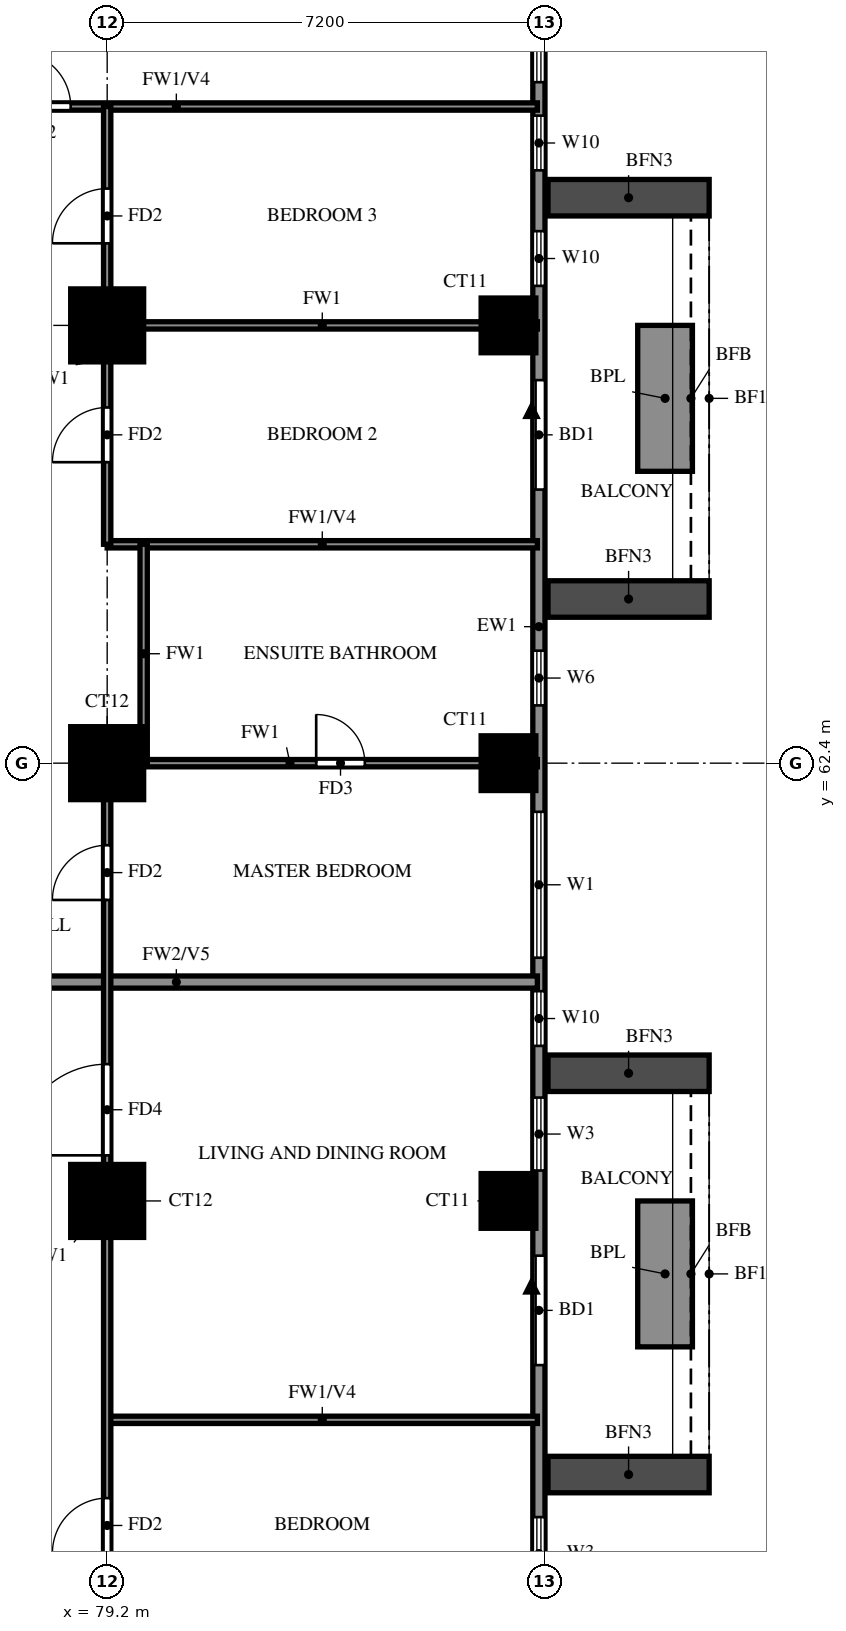
"""IFC4 building model, lengths in metres.
Left out: names, types, materials, properties, quantities, classifications, styles, units other than length and angle.
Written with IfcOpenShell. Run it as: python <this file> out.ifc"""

import sys

from ifc_helpers import new_model, si_unit, direction, frame, frame_2d, origin, origin_2d, place, context, subcontext, project, spatial, rectangle, extrude, source, transform, mapped, element, fill, save


model = new_model("IFC4")
c1 = context("Model", 3, precision=1e-05, world=origin(), true_north=direction((0.0, 1.0)))
c2 = subcontext(c1, "Body", "Model", "MODEL_VIEW")
j1 = project(units=[si_unit("LENGTHUNIT", "METRE"), si_unit("PLANEANGLEUNIT", "RADIAN")], contexts=[c1])
p1 = place(None, origin())
s1 = spatial("IfcSite", under=j1, at=p1, CompositionType="ELEMENT")
p2 = place(p1, origin())
s2 = spatial("IfcBuilding", under=s1, at=p2, CompositionType="ELEMENT")
p3 = place(p2, frame((0.0, 0.0, 93.5)))
s3 = spatial("IfcBuildingStorey", under=s2, at=p3, CompositionType="ELEMENT", Elevation=93.5)
m1 = source(origin(), c2, "Body", "SweptSolid", [
    extrude(rectangle(XDim=1.2, YDim=1.2, at=origin_2d()), origin(), (0.0, 0.0, 1.0), 3.18),
])
p4 = place(p3, frame((79.2, 55.2, 0.0), z_axis=(0.0, 0.0, 1.0), x_axis=(1.0, 0.0, 0.0)))
e1 = element("IfcColumn", 1, at=p4, inside=s3, PredefinedType="COLUMN", context=c2, shape_type="MappedRepresentation", body=[
    mapped(m1, transform((0.0, 0.0, 0.0))),
])
m2 = source(origin(), c2, "Body", "SweptSolid", [
    extrude(rectangle(XDim=0.9, YDim=0.9, at=origin_2d()), origin(), (0.0, 0.0, 1.0), 3.18),
])
p5 = place(p3, frame((85.8, 55.2, 0.0), z_axis=(0.0, 0.0, 1.0), x_axis=(1.0, 0.0, 0.0)))
e2 = element("IfcColumn", 2, at=p5, inside=s3, PredefinedType="COLUMN", context=c2, shape_type="MappedRepresentation", body=[
    mapped(m2, transform((0.0, 0.0, 0.0))),
])
p6 = place(p3, frame((79.2, 62.4, 0.0), z_axis=(0.0, 0.0, 1.0), x_axis=(1.0, 0.0, 0.0)))
e3 = element("IfcColumn", 3, at=p6, inside=s3, PredefinedType="COLUMN", context=c2, shape_type="MappedRepresentation", body=[
    mapped(m1, transform((0.0, 0.0, 0.0))),
])
p7 = place(p3, frame((85.8, 62.4, 0.0), z_axis=(0.0, 0.0, 1.0), x_axis=(1.0, 0.0, 0.0)))
e4 = element("IfcColumn", 4, at=p7, inside=s3, PredefinedType="COLUMN", context=c2, shape_type="MappedRepresentation", body=[
    mapped(m2, transform((0.0, 0.0, 0.0))),
])
p8 = place(p3, frame((79.2, 69.6, 0.0), z_axis=(0.0, 0.0, 1.0), x_axis=(1.0, 0.0, 0.0)))
e5 = element("IfcColumn", 5, at=p8, inside=s3, PredefinedType="COLUMN", context=c2, shape_type="MappedRepresentation", body=[
    mapped(m1, transform((0.0, 0.0, 0.0))),
])
p9 = place(p3, frame((85.8, 69.6, 0.0), z_axis=(0.0, 0.0, 1.0), x_axis=(1.0, 0.0, 0.0)))
e6 = element("IfcColumn", 6, at=p9, inside=s3, PredefinedType="COLUMN", context=c2, shape_type="MappedRepresentation", body=[
    mapped(m2, transform((0.0, 0.0, 0.0))),
])
p10 = place(p3, frame((86.3, 48.2, 0.0), z_axis=(0.0, 0.0, 1.0), x_axis=(0.0, 1.0, 0.0)))
e7 = element("IfcWall", 7, at=p10, inside=s3, PredefinedType="SOLIDWALL", context=c2, shape_type="SweptSolid", body=[
    extrude(rectangle(XDim=28.6, YDim=0.2, at=frame_2d((14.3, 0.0))), origin(), (0.0, 0.0, 1.0), 3.18),
])
p11 = place(p10, frame((4.3, 0.0, 0.0)))
e8 = element("IfcOpeningElement", 8, at=p11, cuts=e7, PredefinedType="OPENING", context=c2, shape_type="SweptSolid", body=[
    extrude(rectangle(XDim=1.8, YDim=2.4, at=frame_2d((0.9, 1.2))), frame((0.0, 0.11, 0.0), z_axis=(0.0, -1.0, 0.0), x_axis=(1.0, 0.0, 0.0)), (0.0, 0.0, 1.0), 0.22),
])
p12 = place(p10, frame((18.7, 0.0, 0.0)))
e9 = element("IfcOpeningElement", 9, at=p12, cuts=e7, PredefinedType="OPENING", context=c2, shape_type="SweptSolid", body=[
    extrude(rectangle(XDim=1.8, YDim=2.4, at=frame_2d((0.9, 1.2))), frame((0.0, 0.11, 0.0), z_axis=(0.0, -1.0, 0.0), x_axis=(1.0, 0.0, 0.0)), (0.0, 0.0, 1.0), 0.22),
])
p13 = place(p10, frame((0.6, 0.0, 0.6)))
e10 = element("IfcOpeningElement", 10, at=p13, cuts=e7, PredefinedType="OPENING", context=c2, shape_type="SweptSolid", body=[
    extrude(rectangle(XDim=1.2, YDim=2.4, at=frame_2d((0.6, 1.2))), frame((0.0, 0.11, 0.0), z_axis=(0.0, -1.0, 0.0), x_axis=(1.0, 0.0, 0.0)), (0.0, 0.0, 1.0), 0.22),
])
p14 = place(p10, frame((7.5, 0.0, 0.6)))
e11 = element("IfcOpeningElement", 11, at=p14, cuts=e7, PredefinedType="OPENING", context=c2, shape_type="SweptSolid", body=[
    extrude(rectangle(XDim=1.2, YDim=2.4, at=frame_2d((0.6, 1.2))), frame((0.0, 0.11, 0.0), z_axis=(0.0, -1.0, 0.0), x_axis=(1.0, 0.0, 0.0)), (0.0, 0.0, 1.0), 0.22),
])
p15 = place(p10, frame((9.55, 0.0, 0.6)))
e12 = element("IfcOpeningElement", 12, at=p15, cuts=e7, PredefinedType="OPENING", context=c2, shape_type="SweptSolid", body=[
    extrude(rectangle(XDim=0.9, YDim=2.4, at=frame_2d((0.45, 1.2))), frame((0.0, 0.11, 0.0), z_axis=(0.0, -1.0, 0.0), x_axis=(1.0, 0.0, 0.0)), (0.0, 0.0, 1.0), 0.22),
])
p16 = place(p10, frame((11.0, 0.0, 0.6)))
e13 = element("IfcOpeningElement", 13, at=p16, cuts=e7, PredefinedType="OPENING", context=c2, shape_type="SweptSolid", body=[
    extrude(rectangle(XDim=2.4, YDim=2.4, at=frame_2d((1.2, 1.2))), frame((0.0, 0.11, 0.0), z_axis=(0.0, -1.0, 0.0), x_axis=(1.0, 0.0, 0.0)), (0.0, 0.0, 1.0), 0.22),
])
p17 = place(p10, frame((15.15, 0.0, 1.5)))
e14 = element("IfcOpeningElement", 14, at=p17, cuts=e7, PredefinedType="OPENING", context=c2, shape_type="SweptSolid", body=[
    extrude(rectangle(XDim=0.9, YDim=0.9, at=frame_2d((0.45, 0.45))), frame((0.0, 0.11, 0.0), z_axis=(0.0, -1.0, 0.0), x_axis=(1.0, 0.0, 0.0)), (0.0, 0.0, 1.0), 0.22),
])
p18 = place(p10, frame((22.05, 0.0, 0.6)))
e15 = element("IfcOpeningElement", 15, at=p18, cuts=e7, PredefinedType="OPENING", context=c2, shape_type="SweptSolid", body=[
    extrude(rectangle(XDim=0.9, YDim=2.4, at=frame_2d((0.45, 1.2))), frame((0.0, 0.11, 0.0), z_axis=(0.0, -1.0, 0.0), x_axis=(1.0, 0.0, 0.0)), (0.0, 0.0, 1.0), 0.22),
])
p19 = place(p10, frame((23.95, 0.0, 0.6)))
e16 = element("IfcOpeningElement", 16, at=p19, cuts=e7, PredefinedType="OPENING", context=c2, shape_type="SweptSolid", body=[
    extrude(rectangle(XDim=0.9, YDim=2.4, at=frame_2d((0.45, 1.2))), frame((0.0, 0.11, 0.0), z_axis=(0.0, -1.0, 0.0), x_axis=(1.0, 0.0, 0.0)), (0.0, 0.0, 1.0), 0.22),
])
p20 = place(p10, frame((25.4, 0.0, 0.6)))
e17 = element("IfcOpeningElement", 17, at=p20, cuts=e7, PredefinedType="OPENING", context=c2, shape_type="SweptSolid", body=[
    extrude(rectangle(XDim=2.4, YDim=2.4, at=frame_2d((1.2, 1.2))), frame((0.0, 0.11, 0.0), z_axis=(0.0, -1.0, 0.0), x_axis=(1.0, 0.0, 0.0)), (0.0, 0.0, 1.0), 0.22),
])
for number, where, z_axis, x_axis in (
    (18, (86.45, 50.7, 0.0), (0.0, 0.0, 1.0), (1.0, 0.0, 0.0)),
    (19, (86.45, 57.3, 0.0), (0.0, 0.0, 1.0), (1.0, 0.0, 0.0)),
):
    element("IfcWall", number, at=place(p3, frame(where, z_axis=z_axis, x_axis=x_axis)), inside=s3, PredefinedType="SOLIDWALL", context=c2, shape_type="SweptSolid", body=[
        extrude(rectangle(XDim=2.65, YDim=0.6, at=frame_2d((1.325, 0.0))), origin(), (0.0, 0.0, 1.0), 2.85),
    ])
p21 = place(p3, frame((88.375, 52.8, 0.0), z_axis=(0.0, 0.0, 1.0), x_axis=(0.0, 1.0, 0.0)))
e20 = element("IfcWall", 20, at=p21, inside=s3, PredefinedType="SOLIDWALL", context=c2, shape_type="SweptSolid", body=[
    extrude(rectangle(XDim=2.4, YDim=0.9, at=frame_2d((1.2, 0.0))), origin(), (0.0, 0.0, 1.0), 0.9),
])
for number, where, z_axis, x_axis in (
    (21, (86.45, 65.1, 0.0), (0.0, 0.0, 1.0), (1.0, 0.0, 0.0)),
    (22, (86.45, 71.7, 0.0), (0.0, 0.0, 1.0), (1.0, 0.0, 0.0)),
):
    element("IfcWall", number, at=place(p3, frame(where, z_axis=z_axis, x_axis=x_axis)), inside=s3, PredefinedType="SOLIDWALL", context=c2, shape_type="SweptSolid", body=[
        extrude(rectangle(XDim=2.65, YDim=0.6, at=frame_2d((1.325, 0.0))), origin(), (0.0, 0.0, 1.0), 2.85),
    ])
p22 = place(p3, frame((88.375, 67.2, 0.0), z_axis=(0.0, 0.0, 1.0), x_axis=(0.0, 1.0, 0.0)))
e23 = element("IfcWall", 23, at=p22, inside=s3, PredefinedType="SOLIDWALL", context=c2, shape_type="SweptSolid", body=[
    extrude(rectangle(XDim=2.4, YDim=0.9, at=frame_2d((1.2, 0.0))), origin(), (0.0, 0.0, 1.0), 0.9),
])
p23 = place(p3, frame((74.4, 58.8, 0.0), z_axis=(0.0, 0.0, 1.0), x_axis=(1.0, 0.0, 0.0)))
e24 = element("IfcWall", 24, at=p23, inside=s3, PredefinedType="SOLIDWALL", context=c2, shape_type="SweptSolid", body=[
    extrude(rectangle(XDim=11.875, YDim=0.2, at=frame_2d((5.938, 0.0))), origin(), (0.0, 0.0, 1.0), 2.28),
])
p24 = place(p3, frame((79.2, 51.6, 0.0), z_axis=(0.0, 0.0, 1.0), x_axis=(1.0, 0.0, 0.0)))
e25 = element("IfcWall", 25, at=p24, inside=s3, PredefinedType="PARTITIONING", context=c2, shape_type="SweptSolid", body=[
    extrude(rectangle(XDim=7.075, YDim=0.12, at=frame_2d((3.538, 0.0))), origin(), (0.0, 0.0, 1.0), 2.28),
])
p25 = place(p3, frame((79.2, 62.4, 0.0), z_axis=(0.0, 0.0, 1.0), x_axis=(1.0, 0.0, 0.0)))
e26 = element("IfcWall", 26, at=p25, inside=s3, PredefinedType="PARTITIONING", context=c2, shape_type="SweptSolid", body=[
    extrude(rectangle(XDim=7.075, YDim=0.12, at=frame_2d((3.538, 0.0))), origin(), (0.0, 0.0, 1.0), 3.18),
])
p26 = place(p25, frame((3.438, 0.0, 0.0)))
e27 = element("IfcOpeningElement", 27, at=p26, cuts=e26, PredefinedType="OPENING", context=c2, shape_type="SweptSolid", body=[
    extrude(rectangle(XDim=0.8, YDim=2.1, at=frame_2d((0.4, 1.05))), frame((0.0, 0.07, 0.0), z_axis=(0.0, -1.0, 0.0), x_axis=(1.0, 0.0, 0.0)), (0.0, 0.0, 1.0), 0.14),
])
p27 = place(p3, frame((79.2, 66.0, 0.0), z_axis=(0.0, 0.0, 1.0), x_axis=(1.0, 0.0, 0.0)))
e28 = element("IfcWall", 28, at=p27, inside=s3, PredefinedType="PARTITIONING", context=c2, shape_type="SweptSolid", body=[
    extrude(rectangle(XDim=7.075, YDim=0.12, at=frame_2d((3.538, 0.0))), origin(), (0.0, 0.0, 1.0), 2.28),
])
p28 = place(p3, frame((79.2, 69.6, 0.0), z_axis=(0.0, 0.0, 1.0), x_axis=(1.0, 0.0, 0.0)))
e29 = element("IfcWall", 29, at=p28, inside=s3, PredefinedType="PARTITIONING", context=c2, shape_type="SweptSolid", body=[
    extrude(rectangle(XDim=7.075, YDim=0.12, at=frame_2d((3.538, 0.0))), origin(), (0.0, 0.0, 1.0), 3.18),
])
p29 = place(p3, frame((74.4, 73.2, 0.0), z_axis=(0.0, 0.0, 1.0), x_axis=(1.0, 0.0, 0.0)))
e30 = element("IfcWall", 30, at=p29, inside=s3, PredefinedType="PARTITIONING", context=c2, shape_type="SweptSolid", body=[
    extrude(rectangle(XDim=11.875, YDim=0.12, at=frame_2d((5.938, 0.0))), origin(), (0.0, 0.0, 1.0), 2.28),
])
p30 = place(p29, frame((3.3, 0.0, 0.0)))
e31 = element("IfcOpeningElement", 31, at=p30, cuts=e30, PredefinedType="OPENING", context=c2, shape_type="SweptSolid", body=[
    extrude(rectangle(XDim=0.9, YDim=2.1, at=frame_2d((0.45, 1.05))), frame((0.0, 0.07, 0.0), z_axis=(0.0, -1.0, 0.0), x_axis=(1.0, 0.0, 0.0)), (0.0, 0.0, 1.0), 0.14),
])
p31 = place(p3, frame((79.2, 48.125, 0.0), z_axis=(0.0, 0.0, 1.0), x_axis=(0.0, 1.0, 0.0)))
e32 = element("IfcWall", 32, at=p31, inside=s3, PredefinedType="PARTITIONING", context=c2, shape_type="SweptSolid", body=[
    extrude(rectangle(XDim=14.275, YDim=0.12, at=frame_2d((7.137, 0.0))), origin(), (0.0, 0.0, 1.0), 3.18),
])
p32 = place(p31, frame((1.288, 0.0, 0.0)))
e33 = element("IfcOpeningElement", 33, at=p32, cuts=e32, PredefinedType="OPENING", context=c2, shape_type="SweptSolid", body=[
    extrude(rectangle(XDim=0.9, YDim=2.1, at=frame_2d((0.45, 1.05))), frame((0.0, 0.07, 0.0), z_axis=(0.0, -1.0, 0.0), x_axis=(1.0, 0.0, 0.0)), (0.0, 0.0, 1.0), 0.14),
])
p33 = place(p31, frame((7.825, 0.0, 0.0)))
e34 = element("IfcOpeningElement", 34, at=p33, cuts=e32, PredefinedType="OPENING", context=c2, shape_type="SweptSolid", body=[
    extrude(rectangle(XDim=1.5, YDim=2.1, at=frame_2d((0.75, 1.05))), frame((0.0, 0.07, 0.0), z_axis=(0.0, -1.0, 0.0), x_axis=(1.0, 0.0, 0.0)), (0.0, 0.0, 1.0), 0.14),
])
p34 = place(p31, frame((12.025, 0.0, 0.0)))
e35 = element("IfcOpeningElement", 35, at=p34, cuts=e32, PredefinedType="OPENING", context=c2, shape_type="SweptSolid", body=[
    extrude(rectangle(XDim=0.9, YDim=2.1, at=frame_2d((0.45, 1.05))), frame((0.0, 0.07, 0.0), z_axis=(0.0, -1.0, 0.0), x_axis=(1.0, 0.0, 0.0)), (0.0, 0.0, 1.0), 0.14),
])
p35 = place(p3, frame((79.2, 66.0, 0.0), z_axis=(0.0, 0.0, 1.0), x_axis=(0.0, 1.0, 0.0)))
e36 = element("IfcWall", 36, at=p35, inside=s3, PredefinedType="PARTITIONING", context=c2, shape_type="SweptSolid", body=[
    extrude(rectangle(XDim=7.2, YDim=0.12, at=frame_2d((3.6, 0.0))), origin(), (0.0, 0.0, 1.0), 3.18),
])
p36 = place(p35, frame((1.35, 0.0, 0.0)))
e37 = element("IfcOpeningElement", 37, at=p36, cuts=e36, PredefinedType="OPENING", context=c2, shape_type="SweptSolid", body=[
    extrude(rectangle(XDim=0.9, YDim=2.1, at=frame_2d((0.45, 1.05))), frame((0.0, 0.07, 0.0), z_axis=(0.0, -1.0, 0.0), x_axis=(1.0, 0.0, 0.0)), (0.0, 0.0, 1.0), 0.14),
])
p37 = place(p35, frame((4.95, 0.0, 0.0)))
e38 = element("IfcOpeningElement", 38, at=p37, cuts=e36, PredefinedType="OPENING", context=c2, shape_type="SweptSolid", body=[
    extrude(rectangle(XDim=0.9, YDim=2.1, at=frame_2d((0.45, 1.05))), frame((0.0, 0.07, 0.0), z_axis=(0.0, -1.0, 0.0), x_axis=(1.0, 0.0, 0.0)), (0.0, 0.0, 1.0), 0.14),
])
p38 = place(p3, frame((79.8, 62.4, 0.0), z_axis=(0.0, 0.0, 1.0), x_axis=(0.0, 1.0, 0.0)))
e39 = element("IfcWall", 39, at=p38, inside=s3, PredefinedType="PARTITIONING", context=c2, shape_type="SweptSolid", body=[
    extrude(rectangle(XDim=3.6, YDim=0.12, at=frame_2d((1.8, 0.0))), origin(), (0.0, 0.0, 1.0), 3.18),
])
p39 = place(p11, origin())
e40 = element("IfcDoor", 40, at=p39, inside=s3, OperationType="DOUBLE_DOOR_SLIDING", PredefinedType="DOOR", context=c2, shape_type="SweptSolid", body=[
    extrude(rectangle(XDim=1.8, YDim=2.4, at=frame_2d((0.9, 1.2))), frame((0.0, 0.025, 0.0), z_axis=(0.0, -1.0, 0.0), x_axis=(1.0, 0.0, 0.0)), (0.0, 0.0, 1.0), 0.05),
])
fill(e8, e40)
p40 = place(p12, origin())
e41 = element("IfcDoor", 41, at=p40, inside=s3, OperationType="DOUBLE_DOOR_SLIDING", PredefinedType="DOOR", context=c2, shape_type="SweptSolid", body=[
    extrude(rectangle(XDim=1.8, YDim=2.4, at=frame_2d((0.9, 1.2))), frame((0.0, 0.025, 0.0), z_axis=(0.0, -1.0, 0.0), x_axis=(1.0, 0.0, 0.0)), (0.0, 0.0, 1.0), 0.05),
])
fill(e9, e41)
p41 = place(p13, origin())
e42 = element("IfcWindow", 42, at=p41, inside=s3, PartitioningType="SINGLE_PANEL", PredefinedType="WINDOW", context=c2, shape_type="SweptSolid", body=[
    extrude(rectangle(XDim=1.2, YDim=2.4, at=frame_2d((0.6, 1.2))), frame((0.0, 0.03, 0.0), z_axis=(0.0, -1.0, 0.0), x_axis=(1.0, 0.0, 0.0)), (0.0, 0.0, 1.0), 0.06),
])
fill(e10, e42)
p42 = place(p14, origin())
e43 = element("IfcWindow", 43, at=p42, inside=s3, PartitioningType="SINGLE_PANEL", PredefinedType="WINDOW", context=c2, shape_type="SweptSolid", body=[
    extrude(rectangle(XDim=1.2, YDim=2.4, at=frame_2d((0.6, 1.2))), frame((0.0, 0.03, 0.0), z_axis=(0.0, -1.0, 0.0), x_axis=(1.0, 0.0, 0.0)), (0.0, 0.0, 1.0), 0.06),
])
fill(e11, e43)
p43 = place(p15, origin())
e44 = element("IfcWindow", 44, at=p43, inside=s3, PartitioningType="SINGLE_PANEL", PredefinedType="WINDOW", context=c2, shape_type="SweptSolid", body=[
    extrude(rectangle(XDim=0.9, YDim=2.4, at=frame_2d((0.45, 1.2))), frame((0.0, 0.03, 0.0), z_axis=(0.0, -1.0, 0.0), x_axis=(1.0, 0.0, 0.0)), (0.0, 0.0, 1.0), 0.06),
])
fill(e12, e44)
p44 = place(p16, origin())
e45 = element("IfcWindow", 45, at=p44, inside=s3, PartitioningType="DOUBLE_PANEL_VERTICAL", PredefinedType="WINDOW", context=c2, shape_type="SweptSolid", body=[
    extrude(rectangle(XDim=2.4, YDim=2.4, at=frame_2d((1.2, 1.2))), frame((0.0, 0.03, 0.0), z_axis=(0.0, -1.0, 0.0), x_axis=(1.0, 0.0, 0.0)), (0.0, 0.0, 1.0), 0.06),
])
fill(e13, e45)
p45 = place(p17, origin())
e46 = element("IfcWindow", 46, at=p45, inside=s3, PartitioningType="SINGLE_PANEL", PredefinedType="WINDOW", context=c2, shape_type="SweptSolid", body=[
    extrude(rectangle(XDim=0.9, YDim=0.9, at=frame_2d((0.45, 0.45))), frame((0.0, 0.03, 0.0), z_axis=(0.0, -1.0, 0.0), x_axis=(1.0, 0.0, 0.0)), (0.0, 0.0, 1.0), 0.06),
])
fill(e14, e46)
p46 = place(p18, origin())
e47 = element("IfcWindow", 47, at=p46, inside=s3, PartitioningType="SINGLE_PANEL", PredefinedType="WINDOW", context=c2, shape_type="SweptSolid", body=[
    extrude(rectangle(XDim=0.9, YDim=2.4, at=frame_2d((0.45, 1.2))), frame((0.0, 0.03, 0.0), z_axis=(0.0, -1.0, 0.0), x_axis=(1.0, 0.0, 0.0)), (0.0, 0.0, 1.0), 0.06),
])
fill(e15, e47)
p47 = place(p19, origin())
e48 = element("IfcWindow", 48, at=p47, inside=s3, PartitioningType="SINGLE_PANEL", PredefinedType="WINDOW", context=c2, shape_type="SweptSolid", body=[
    extrude(rectangle(XDim=0.9, YDim=2.4, at=frame_2d((0.45, 1.2))), frame((0.0, 0.03, 0.0), z_axis=(0.0, -1.0, 0.0), x_axis=(1.0, 0.0, 0.0)), (0.0, 0.0, 1.0), 0.06),
])
fill(e16, e48)
p48 = place(p20, origin())
e49 = element("IfcWindow", 49, at=p48, inside=s3, PartitioningType="DOUBLE_PANEL_VERTICAL", PredefinedType="WINDOW", context=c2, shape_type="SweptSolid", body=[
    extrude(rectangle(XDim=2.4, YDim=2.4, at=frame_2d((1.2, 1.2))), frame((0.0, 0.03, 0.0), z_axis=(0.0, -1.0, 0.0), x_axis=(1.0, 0.0, 0.0)), (0.0, 0.0, 1.0), 0.06),
])
fill(e17, e49)
p49 = place(p32, origin())
e50 = element("IfcDoor", 50, at=p49, inside=s3, OperationType="SINGLE_SWING_LEFT", PredefinedType="DOOR", context=c2, shape_type="SweptSolid", body=[
    extrude(rectangle(XDim=0.9, YDim=2.1, at=frame_2d((0.45, 1.05))), frame((0.0, 0.025, 0.0), z_axis=(0.0, -1.0, 0.0), x_axis=(1.0, 0.0, 0.0)), (0.0, 0.0, 1.0), 0.05),
])
fill(e33, e50)
p50 = place(p33, origin())
e51 = element("IfcDoor", 51, at=p50, inside=s3, OperationType="SINGLE_SWING_LEFT", PredefinedType="DOOR", context=c2, shape_type="SweptSolid", body=[
    extrude(rectangle(XDim=1.5, YDim=2.1, at=frame_2d((0.75, 1.05))), frame((0.0, 0.025, 0.0), z_axis=(0.0, -1.0, 0.0), x_axis=(1.0, 0.0, 0.0)), (0.0, 0.0, 1.0), 0.05),
])
fill(e34, e51)
p51 = place(p34, origin())
e52 = element("IfcDoor", 52, at=p51, inside=s3, OperationType="SINGLE_SWING_LEFT", PredefinedType="DOOR", context=c2, shape_type="SweptSolid", body=[
    extrude(rectangle(XDim=0.9, YDim=2.1, at=frame_2d((0.45, 1.05))), frame((0.0, 0.025, 0.0), z_axis=(0.0, -1.0, 0.0), x_axis=(1.0, 0.0, 0.0)), (0.0, 0.0, 1.0), 0.05),
])
fill(e35, e52)
p52 = place(p26, origin())
e53 = element("IfcDoor", 53, at=p52, inside=s3, OperationType="SINGLE_SWING_RIGHT", PredefinedType="DOOR", context=c2, shape_type="SweptSolid", body=[
    extrude(rectangle(XDim=0.8, YDim=2.1, at=frame_2d((0.4, 1.05))), frame((0.0, 0.025, 0.0), z_axis=(0.0, -1.0, 0.0), x_axis=(1.0, 0.0, 0.0)), (0.0, 0.0, 1.0), 0.05),
])
fill(e27, e53)
p53 = place(p36, origin())
e54 = element("IfcDoor", 54, at=p53, inside=s3, OperationType="SINGLE_SWING_LEFT", PredefinedType="DOOR", context=c2, shape_type="SweptSolid", body=[
    extrude(rectangle(XDim=0.9, YDim=2.1, at=frame_2d((0.45, 1.05))), frame((0.0, 0.025, 0.0), z_axis=(0.0, -1.0, 0.0), x_axis=(1.0, 0.0, 0.0)), (0.0, 0.0, 1.0), 0.05),
])
fill(e37, e54)
p54 = place(p37, origin())
e55 = element("IfcDoor", 55, at=p54, inside=s3, OperationType="SINGLE_SWING_LEFT", PredefinedType="DOOR", context=c2, shape_type="SweptSolid", body=[
    extrude(rectangle(XDim=0.9, YDim=2.1, at=frame_2d((0.45, 1.05))), frame((0.0, 0.025, 0.0), z_axis=(0.0, -1.0, 0.0), x_axis=(1.0, 0.0, 0.0)), (0.0, 0.0, 1.0), 0.05),
])
fill(e38, e55)
p55 = place(p30, origin())
e56 = element("IfcDoor", 56, at=p55, inside=s3, OperationType="SINGLE_SWING_RIGHT", PredefinedType="DOOR", context=c2, shape_type="SweptSolid", body=[
    extrude(rectangle(XDim=0.9, YDim=2.1, at=frame_2d((0.45, 1.05))), frame((0.0, 0.025, 0.0), z_axis=(0.0, -1.0, 0.0), x_axis=(1.0, 0.0, 0.0)), (0.0, 0.0, 1.0), 0.05),
])
fill(e31, e56)
save(model, sys.argv[1])
